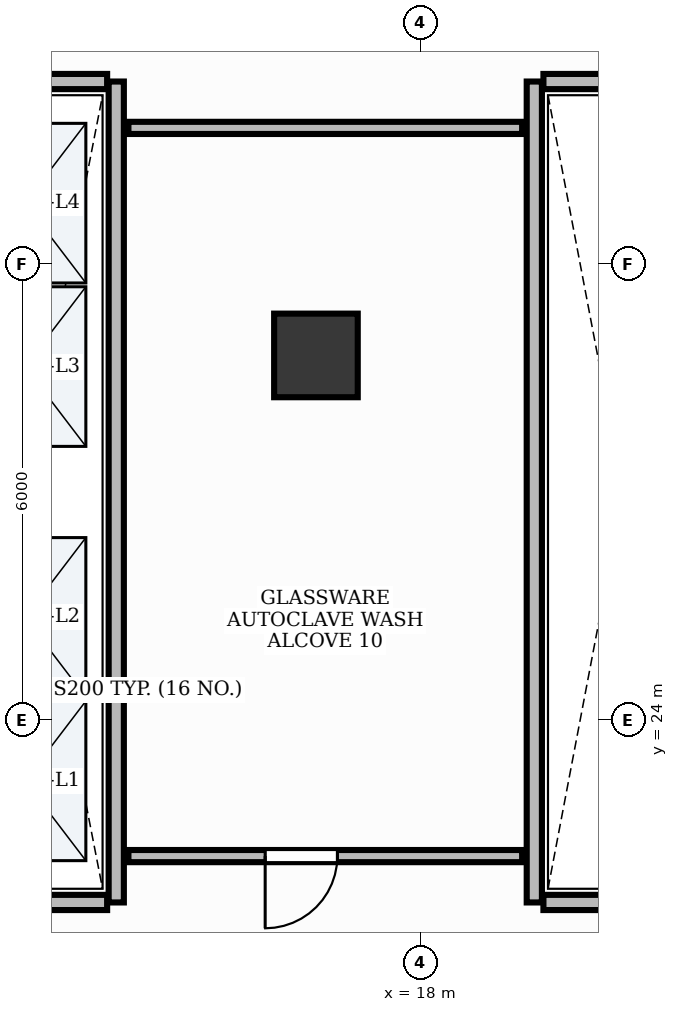
"""IFC4 building model, lengths in metres.
Left out: names, types, materials, properties, quantities, classifications, styles, units other than length and angle.
Written with IfcOpenShell. Run it as: python <this file> out.ifc"""

import sys

from ifc_helpers import new_model, si_unit, direction, frame, frame_2d, origin, origin_2d, place, context, subcontext, project, spatial, rectangle, extrude, element, fill, save


model = new_model("IFC4")
c1 = context("Model", 3, precision=1e-05, world=origin(), true_north=direction((0.0, 1.0)))
c2 = subcontext(c1, "Body", "Model", "MODEL_VIEW")
j1 = project(units=[si_unit("LENGTHUNIT", "METRE"), si_unit("PLANEANGLEUNIT", "RADIAN")], contexts=[c1])
p1 = place(None, origin())
s1 = spatial("IfcSite", under=j1, at=p1, CompositionType="ELEMENT")
p2 = place(p1, origin())
s2 = spatial("IfcBuilding", under=s1, at=p2, CompositionType="ELEMENT")
p3 = place(p2, frame((0.0, 0.0, 102.6)))
s3 = spatial("IfcBuildingStorey", under=s2, at=p3, CompositionType="ELEMENT", Elevation=102.6)
p4 = place(p3, frame((16.627, 28.797, -0.0), z_axis=(0.0, 0.0, 1.0), x_axis=(1.0, 0.0, 0.0)))
e1 = element("IfcColumn", 1, at=p4, inside=s3, PredefinedType="COLUMN", context=c2, shape_type="SweptSolid", body=[
    extrude(rectangle(XDim=1.1, YDim=1.1, at=origin_2d()), origin(), (0.0, 0.0, 1.0), 3.901),
])
p5 = place(p3, frame((14.0, 21.6, 0.0), z_axis=(0.0, 0.0, 1.0), x_axis=(0.0, 1.0, 0.0)))
e2 = element("IfcWall", 2, at=p5, inside=s3, PredefinedType="PARTITIONING", context=c2, shape_type="SweptSolid", body=[
    extrude(rectangle(XDim=10.8, YDim=0.2, at=frame_2d((5.4, 0.0))), origin(), (0.0, 0.0, 1.0), 2.91),
])
for number, where, z_axis, x_axis in (
    (3, (11.72, 21.6, 0.0), (0.0, 0.0, 1.0), (1.0, 0.0, 0.0)),
    (4, (11.72, 32.4, 0.0), (0.0, 0.0, 1.0), (1.0, 0.0, 0.0)),
):
    element("IfcWall", number, at=place(p3, frame(where, z_axis=z_axis, x_axis=x_axis)), inside=s3, PredefinedType="PARTITIONING", context=c2, shape_type="SweptSolid", body=[
        extrude(rectangle(XDim=2.16, YDim=0.2, at=frame_2d((1.08, 0.0))), origin(), (0.0, 0.0, 1.0), 2.91),
    ])
p6 = place(p3, frame((19.5, 21.6, 0.0), z_axis=(0.0, 0.0, 1.0), x_axis=(0.0, 1.0, 0.0)))
e5 = element("IfcWall", 5, at=p6, inside=s3, PredefinedType="PARTITIONING", context=c2, shape_type="SweptSolid", body=[
    extrude(rectangle(XDim=10.8, YDim=0.2, at=frame_2d((5.4, 0.0))), origin(), (0.0, 0.0, 1.0), 2.91),
])
for number, where, z_axis, x_axis in (
    (6, (19.62, 21.6, 0.0), (0.0, 0.0, 1.0), (1.0, 0.0, 0.0)),
    (7, (19.62, 32.4, 0.0), (0.0, 0.0, 1.0), (1.0, 0.0, 0.0)),
):
    element("IfcWall", number, at=place(p3, frame(where, z_axis=z_axis, x_axis=x_axis)), inside=s3, PredefinedType="PARTITIONING", context=c2, shape_type="SweptSolid", body=[
        extrude(rectangle(XDim=2.11, YDim=0.2, at=frame_2d((1.055, 0.0))), origin(), (0.0, 0.0, 1.0), 2.91),
    ])
p7 = place(p3, frame((19.34, 22.21, 0.0), z_axis=(0.0, 0.0, 1.0), x_axis=(-1.0, 0.0, 0.0)))
e8 = element("IfcWall", 8, at=p7, inside=s3, PredefinedType="PARTITIONING", context=c2, shape_type="SweptSolid", body=[
    extrude(rectangle(XDim=5.18, YDim=0.16, at=frame_2d((2.59, 0.0))), origin(), (0.0, 0.0, 1.0), 2.91),
])
p8 = place(p7, frame((2.431, 0.0, 0.0)))
e9 = element("IfcOpeningElement", 9, at=p8, cuts=e8, PredefinedType="OPENING", context=c2, shape_type="SweptSolid", body=[
    extrude(rectangle(XDim=0.95, YDim=2.15, at=frame_2d((0.475, 1.075))), frame((0.0, 0.095, 0.0), z_axis=(0.0, -1.0, 0.0), x_axis=(1.0, 0.0, 0.0)), (0.0, 0.0, 1.0), 0.19),
])
p9 = place(p3, frame((14.16, 31.79, 0.0), z_axis=(0.0, 0.0, 1.0), x_axis=(1.0, 0.0, 0.0)))
e10 = element("IfcWall", 10, at=p9, inside=s3, PredefinedType="PARTITIONING", context=c2, shape_type="SweptSolid", body=[
    extrude(rectangle(XDim=5.18, YDim=0.16, at=frame_2d((2.59, 0.0))), origin(), (0.0, 0.0, 1.0), 2.91),
])
p10 = place(p8, origin())
e11 = element("IfcDoor", 11, at=p10, inside=s3, OperationType="SINGLE_SWING_RIGHT", PredefinedType="DOOR", context=c2, shape_type="SweptSolid", body=[
    extrude(rectangle(XDim=0.95, YDim=2.15, at=frame_2d((0.475, 1.075))), frame((0.0, 0.025, 0.0), z_axis=(0.0, -1.0, 0.0), x_axis=(1.0, 0.0, 0.0)), (0.0, 0.0, 1.0), 0.05),
])
fill(e9, e11)
save(model, sys.argv[1])
